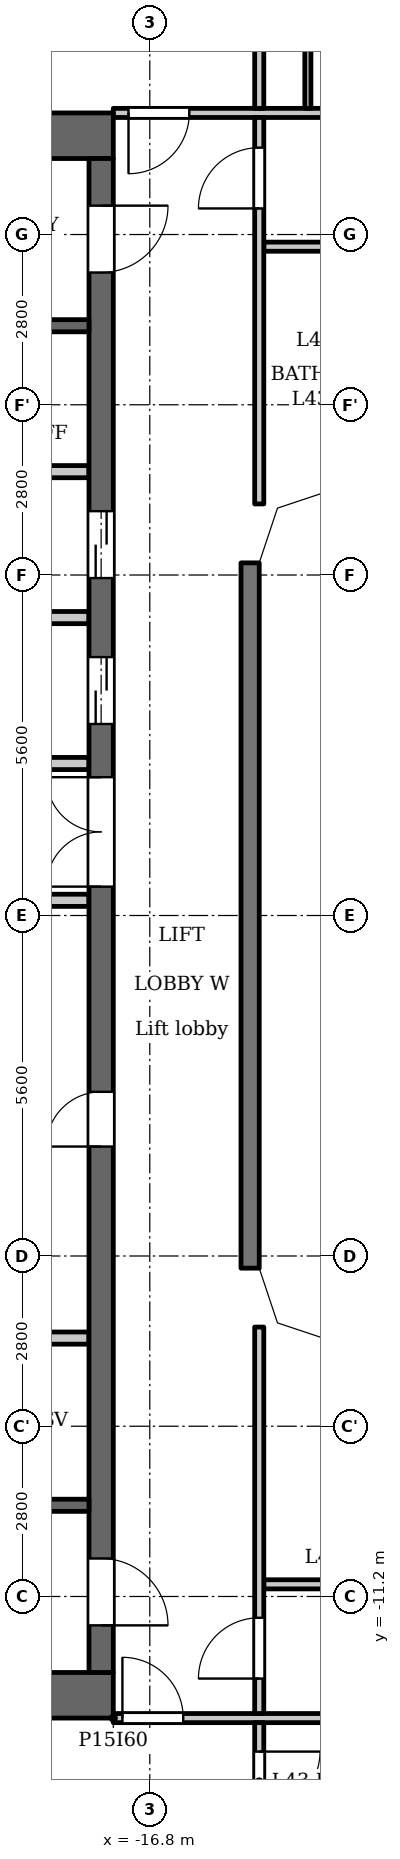
"""IFC4 building model, lengths in metres.
Left out: names, types, materials, properties, quantities, classifications, styles, units other than length and angle.
Written with IfcOpenShell. Run it as: python <this file> out.ifc"""

import sys

from ifc_helpers import new_model, si_unit, direction, frame, frame_2d, origin, place, context, subcontext, project, spatial, polyline, rectangle, outline, extrude, element, fill, save


model = new_model("IFC4")
c1 = context("Model", 3, precision=1e-05, world=origin(), true_north=direction((0.0, 1.0)))
c2 = subcontext(c1, "Body", "Model", "MODEL_VIEW")
j1 = project(units=[si_unit("LENGTHUNIT", "METRE"), si_unit("PLANEANGLEUNIT", "RADIAN")], contexts=[c1])
p1 = place(None, origin())
s1 = spatial("IfcSite", under=j1, at=p1, CompositionType="ELEMENT")
p2 = place(p1, origin())
s2 = spatial("IfcBuilding", under=s1, at=p2, CompositionType="ELEMENT")
p3 = place(p2, frame((0.0, 0.0, 167.6)))
s3 = spatial("IfcBuildingStorey", under=s2, at=p3, CompositionType="ELEMENT", Elevation=167.6)
p4 = place(p3, frame((-15.15, -5.8, 0.0), z_axis=(0.0, 0.0, 1.0), x_axis=(0.0, 1.0, 0.0)))
e1 = element("IfcWall", 1, at=p4, inside=s3, PredefinedType="SOLIDWALL", context=c2, shape_type="SweptSolid", body=[
    extrude(rectangle(XDim=11.6, YDim=0.3, at=frame_2d((5.8, 0.0))), origin(), (0.0, 0.0, 1.0), 3.2),
])
for number, where, z_axis, x_axis in (
    (2, (-17.4, 12.825, 0.0), (0.0, 0.0, 1.0), (-1.0, 0.0, 0.0)),
    (3, (-17.4, -12.825, 0.0), (0.0, 0.0, 1.0), (-1.0, 0.0, 0.0)),
):
    element("IfcWall", number, at=place(p3, frame(where, z_axis=z_axis, x_axis=x_axis)), inside=s3, PredefinedType="SHEAR", context=c2, shape_type="SweptSolid", body=[
        extrude(rectangle(XDim=10.4, YDim=0.75, at=frame_2d((5.2, 0.0))), origin(), (0.0, 0.0, 1.0), 3.2),
    ])
p5 = place(p3, frame((-17.6, -12.45, 0.0), z_axis=(0.0, 0.0, 1.0), x_axis=(0.0, 1.0, 0.0)))
e4 = element("IfcWall", 4, at=p5, inside=s3, PredefinedType="SHEAR", context=c2, shape_type="SweptSolid", body=[
    extrude(rectangle(XDim=24.9, YDim=0.4, at=frame_2d((12.45, 0.0))), origin(), (0.0, 0.0, 1.0), 3.2),
])
p6 = place(p5, frame((8.65, 0.0, 0.0)))
e5 = element("IfcOpeningElement", 5, at=p6, cuts=e4, PredefinedType="OPENING", context=c2, shape_type="SweptSolid", body=[
    extrude(rectangle(XDim=0.9, YDim=2.1, at=frame_2d((0.45, 1.05))), frame((0.0, 0.21, 0.0), z_axis=(0.0, -1.0, 0.0), x_axis=(1.0, 0.0, 0.0)), (0.0, 0.0, 1.0), 0.42),
])
p7 = place(p5, frame((15.6, 0.0, 0.0)))
e6 = element("IfcOpeningElement", 6, at=p7, cuts=e4, PredefinedType="OPENING", context=c2, shape_type="SweptSolid", body=[
    extrude(rectangle(XDim=1.1, YDim=2.1, at=frame_2d((0.55, 1.05))), frame((0.0, 0.21, 0.0), z_axis=(0.0, -1.0, 0.0), x_axis=(1.0, 0.0, 0.0)), (0.0, 0.0, 1.0), 0.42),
])
p8 = place(p5, frame((18.0, 0.0, 0.0)))
e7 = element("IfcOpeningElement", 7, at=p8, cuts=e4, PredefinedType="OPENING", context=c2, shape_type="SweptSolid", body=[
    extrude(rectangle(XDim=1.1, YDim=2.1, at=frame_2d((0.55, 1.05))), frame((0.0, 0.21, 0.0), z_axis=(0.0, -1.0, 0.0), x_axis=(1.0, 0.0, 0.0)), (0.0, 0.0, 1.0), 0.42),
])
p9 = place(p5, frame((23.025, 0.0, 0.0)))
e8 = element("IfcOpeningElement", 8, at=p9, cuts=e4, PredefinedType="OPENING", context=c2, shape_type="SweptSolid", body=[
    extrude(rectangle(XDim=1.1, YDim=2.1, at=frame_2d((0.55, 1.05))), frame((0.0, 0.21, 0.0), z_axis=(0.0, -1.0, 0.0), x_axis=(1.0, 0.0, 0.0)), (0.0, 0.0, 1.0), 0.42),
])
p10 = place(p5, frame((0.775, 0.0, 0.0)))
e9 = element("IfcOpeningElement", 9, at=p10, cuts=e4, PredefinedType="OPENING", context=c2, shape_type="SweptSolid", body=[
    extrude(rectangle(XDim=1.1, YDim=2.1, at=frame_2d((0.55, 1.05))), frame((0.0, 0.21, 0.0), z_axis=(0.0, -1.0, 0.0), x_axis=(1.0, 0.0, 0.0)), (0.0, 0.0, 1.0), 0.42),
])
p11 = place(p5, frame((12.925, 0.0, 0.0)))
e10 = element("IfcOpeningElement", 10, at=p11, cuts=e4, PredefinedType="OPENING", context=c2, shape_type="SweptSolid", body=[
    extrude(rectangle(XDim=1.8, YDim=2.1, at=frame_2d((0.9, 1.05))), frame((0.0, 0.21, 0.0), z_axis=(0.0, -1.0, 0.0), x_axis=(1.0, 0.0, 0.0)), (0.0, 0.0, 1.0), 0.42),
])
p12 = place(p3, frame((-17.8, -9.7, 0.0), z_axis=(0.0, 0.0, 1.0), x_axis=(-1.0, 0.0, 0.0)))
e11 = element("IfcWall", 11, at=p12, inside=s3, PredefinedType="SHEAR", context=c2, shape_type="SweptSolid", body=[
    extrude(rectangle(XDim=8.45, YDim=0.2, at=frame_2d((4.225, 0.0))), origin(), (0.0, 0.0, 1.0), 3.2),
])
p13 = place(p12, frame((0.85, 0.0, 0.0)))
e12 = element("IfcOpeningElement", 12, at=p13, cuts=e11, PredefinedType="OPENING", context=c2, shape_type="SweptSolid", body=[
    extrude(rectangle(XDim=1.1, YDim=2.1, at=frame_2d((0.55, 1.05))), frame((0.0, 0.11, 0.0), z_axis=(0.0, -1.0, 0.0), x_axis=(1.0, 0.0, 0.0)), (0.0, 0.0, 1.0), 0.22),
])
p14 = place(p12, frame((3.75, 0.0, 0.0)))
e13 = element("IfcOpeningElement", 13, at=p14, cuts=e11, PredefinedType="OPENING", context=c2, shape_type="SweptSolid", body=[
    extrude(rectangle(XDim=1.1, YDim=2.1, at=frame_2d((0.55, 1.05))), frame((0.0, 0.11, 0.0), z_axis=(0.0, -1.0, 0.0), x_axis=(1.0, 0.0, 0.0)), (0.0, 0.0, 1.0), 0.22),
])
p15 = place(p3, frame((-17.8, -6.95, 0.0), z_axis=(0.0, 0.0, 1.0), x_axis=(-1.0, 0.0, 0.0)))
e14 = element("IfcWall", 14, at=p15, inside=s3, PredefinedType="PARTITIONING", context=c2, shape_type="SweptSolid", body=[
    extrude(rectangle(XDim=2.8, YDim=0.2, at=frame_2d((1.4, 0.0))), origin(), (0.0, 0.0, 1.0), 3.2),
])
p16 = place(p3, frame((-17.8, 0.25, 0.0), z_axis=(0.0, 0.0, 1.0), x_axis=(-1.0, 0.0, 0.0)))
e15 = element("IfcWall", 15, at=p16, inside=s3, PredefinedType="PARTITIONING", context=c2, shape_type="SweptSolid", body=[
    extrude(rectangle(XDim=3.0, YDim=0.2, at=frame_2d((1.5, 0.0))), origin(), (0.0, 0.0, 1.0), 3.2),
])
p17 = place(p16, frame((1.98, 0.0, 0.0)))
e16 = element("IfcOpeningElement", 16, at=p17, cuts=e15, PredefinedType="OPENING", context=c2, shape_type="SweptSolid", body=[
    extrude(rectangle(XDim=0.9, YDim=2.1, at=frame_2d((0.45, 1.05))), frame((0.0, 0.11, 0.0), z_axis=(0.0, -1.0, 0.0), x_axis=(1.0, 0.0, 0.0)), (0.0, 0.0, 1.0), 0.22),
])
p18 = place(p3, frame((-17.8, 2.5, 0.0), z_axis=(0.0, 0.0, 1.0), x_axis=(-1.0, 0.0, 0.0)))
e17 = element("IfcWall", 17, at=p18, inside=s3, PredefinedType="PARTITIONING", context=c2, shape_type="SweptSolid", body=[
    extrude(rectangle(XDim=3.0, YDim=0.2, at=frame_2d((1.5, 0.0))), origin(), (0.0, 0.0, 1.0), 3.2),
])
for number, where, z_axis, x_axis in (
    (18, (-17.8, 4.9, 0.0), (0.0, 0.0, 1.0), (-1.0, 0.0, 0.0)),
    (19, (-17.8, 7.3, 0.0), (0.0, 0.0, 1.0), (-1.0, 0.0, 0.0)),
):
    element("IfcWall", number, at=place(p3, frame(where, z_axis=z_axis, x_axis=x_axis)), inside=s3, PredefinedType="PARTITIONING", context=c2, shape_type="SweptSolid", body=[
        extrude(rectangle(XDim=2.8, YDim=0.2, at=frame_2d((1.4, 0.0))), origin(), (0.0, 0.0, 1.0), 3.2),
    ])
p19 = place(p3, frame((-17.8, 9.7, 0.0), z_axis=(0.0, 0.0, 1.0), x_axis=(-1.0, 0.0, 0.0)))
e20 = element("IfcWall", 20, at=p19, inside=s3, PredefinedType="SHEAR", context=c2, shape_type="SweptSolid", body=[
    extrude(rectangle(XDim=8.45, YDim=0.2, at=frame_2d((4.225, 0.0))), origin(), (0.0, 0.0, 1.0), 3.2),
])
p20 = place(p19, frame((0.85, 0.0, 0.0)))
e21 = element("IfcOpeningElement", 21, at=p20, cuts=e20, PredefinedType="OPENING", context=c2, shape_type="SweptSolid", body=[
    extrude(rectangle(XDim=1.1, YDim=2.1, at=frame_2d((0.55, 1.05))), frame((0.0, 0.11, 0.0), z_axis=(0.0, -1.0, 0.0), x_axis=(1.0, 0.0, 0.0)), (0.0, 0.0, 1.0), 0.22),
])
p21 = place(p19, frame((3.75, 0.0, 0.0)))
e22 = element("IfcOpeningElement", 22, at=p21, cuts=e20, PredefinedType="OPENING", context=c2, shape_type="SweptSolid", body=[
    extrude(rectangle(XDim=1.1, YDim=2.1, at=frame_2d((0.55, 1.05))), frame((0.0, 0.11, 0.0), z_axis=(0.0, -1.0, 0.0), x_axis=(1.0, 0.0, 0.0)), (0.0, 0.0, 1.0), 0.22),
])
p22 = place(p3, frame((-17.4, -13.2, 0.0), z_axis=(0.0, 0.0, 1.0), x_axis=(1.0, 0.0, 0.0)))
e23 = element("IfcWall", 23, at=p22, inside=s3, PredefinedType="PARTITIONING", context=c2, shape_type="SweptSolid", body=[
    extrude(rectangle(XDim=34.8, YDim=0.15, at=frame_2d((17.4, 0.0))), origin(), (0.0, 0.0, 1.0), 3.2),
])
p23 = place(p22, frame((0.15, 0.0, 0.0)))
e24 = element("IfcOpeningElement", 24, at=p23, cuts=e23, PredefinedType="OPENING", context=c2, shape_type="SweptSolid", body=[
    extrude(rectangle(XDim=1.0, YDim=2.1, at=frame_2d((0.5, 1.05))), frame((0.0, 0.085, 0.0), z_axis=(0.0, -1.0, 0.0), x_axis=(1.0, 0.0, 0.0)), (0.0, 0.0, 1.0), 0.17),
])
p24 = place(p22, frame((33.55, 0.0, 0.0)))
e25 = element("IfcOpeningElement", 25, at=p24, cuts=e23, PredefinedType="OPENING", context=c2, shape_type="SweptSolid", body=[
    extrude(rectangle(XDim=1.0, YDim=2.1, at=frame_2d((0.5, 1.05))), frame((0.0, 0.085, 0.0), z_axis=(0.0, -1.0, 0.0), x_axis=(1.0, 0.0, 0.0)), (0.0, 0.0, 1.0), 0.17),
])
p25 = place(p22, frame((15.7, 0.0, 0.0)))
e26 = element("IfcOpeningElement", 26, at=p25, cuts=e23, PredefinedType="OPENING", context=c2, shape_type="SweptSolid", body=[
    extrude(rectangle(XDim=1.0, YDim=2.1, at=frame_2d((0.5, 1.05))), frame((0.0, 0.085, 0.0), z_axis=(0.0, -1.0, 0.0), x_axis=(1.0, 0.0, 0.0)), (0.0, 0.0, 1.0), 0.17),
])
p26 = place(p22, frame((26.9, 0.0, 0.0)))
e27 = element("IfcOpeningElement", 27, at=p26, cuts=e23, PredefinedType="OPENING", context=c2, shape_type="SweptSolid", body=[
    extrude(rectangle(XDim=1.0, YDim=2.1, at=frame_2d((0.5, 1.05))), frame((0.0, 0.085, 0.0), z_axis=(0.0, -1.0, 0.0), x_axis=(1.0, 0.0, 0.0)), (0.0, 0.0, 1.0), 0.17),
])
p27 = place(p3, frame((-14.925, -11.0, 0.0), z_axis=(0.0, 0.0, 1.0), x_axis=(1.0, 0.0, 0.0)))
e28 = element("IfcWall", 28, at=p27, inside=s3, PredefinedType="PARTITIONING", context=c2, shape_type="SweptSolid", body=[
    extrude(rectangle(XDim=29.85, YDim=0.15, at=frame_2d((14.925, 0.0))), origin(), (0.0, 0.0, 1.0), 3.2),
])
p28 = place(p27, frame((9.875, 0.0, 0.0)))
e29 = element("IfcOpeningElement", 29, at=p28, cuts=e28, PredefinedType="OPENING", context=c2, shape_type="SweptSolid", body=[
    extrude(rectangle(XDim=1.0, YDim=2.1, at=frame_2d((0.5, 1.05))), frame((0.0, 0.085, 0.0), z_axis=(0.0, -1.0, 0.0), x_axis=(1.0, 0.0, 0.0)), (0.0, 0.0, 1.0), 0.17),
])
p29 = place(p27, frame((17.875, 0.0, 0.0)))
e30 = element("IfcOpeningElement", 30, at=p29, cuts=e28, PredefinedType="OPENING", context=c2, shape_type="SweptSolid", body=[
    extrude(rectangle(XDim=1.0, YDim=2.1, at=frame_2d((0.5, 1.05))), frame((0.0, 0.085, 0.0), z_axis=(0.0, -1.0, 0.0), x_axis=(1.0, 0.0, 0.0)), (0.0, 0.0, 1.0), 0.17),
])
p30 = place(p3, frame((-14.925, 11.0, 0.0), z_axis=(0.0, 0.0, 1.0), x_axis=(1.0, 0.0, 0.0)))
e31 = element("IfcWall", 31, at=p30, inside=s3, PredefinedType="PARTITIONING", context=c2, shape_type="SweptSolid", body=[
    extrude(rectangle(XDim=29.85, YDim=0.15, at=frame_2d((14.925, 0.0))), origin(), (0.0, 0.0, 1.0), 3.2),
])
p31 = place(p30, frame((2.475, 0.0, 0.0)))
e32 = element("IfcOpeningElement", 32, at=p31, cuts=e31, PredefinedType="OPENING", context=c2, shape_type="SweptSolid", body=[
    extrude(rectangle(XDim=1.0, YDim=2.1, at=frame_2d((0.5, 1.05))), frame((0.0, 0.085, 0.0), z_axis=(0.0, -1.0, 0.0), x_axis=(1.0, 0.0, 0.0)), (0.0, 0.0, 1.0), 0.17),
])
p32 = place(p30, frame((26.275, 0.0, 0.0)))
e33 = element("IfcOpeningElement", 33, at=p32, cuts=e31, PredefinedType="OPENING", context=c2, shape_type="SweptSolid", body=[
    extrude(rectangle(XDim=1.0, YDim=2.1, at=frame_2d((0.5, 1.05))), frame((0.0, 0.085, 0.0), z_axis=(0.0, -1.0, 0.0), x_axis=(1.0, 0.0, 0.0)), (0.0, 0.0, 1.0), 0.17),
])
p33 = place(p3, frame((-17.4, 13.2, 0.0), z_axis=(0.0, 0.0, 1.0), x_axis=(1.0, 0.0, 0.0)))
e34 = element("IfcWall", 34, at=p33, inside=s3, PredefinedType="PARTITIONING", context=c2, shape_type="SweptSolid", body=[
    extrude(rectangle(XDim=34.8, YDim=0.15, at=frame_2d((17.4, 0.0))), origin(), (0.0, 0.0, 1.0), 3.2),
])
p34 = place(p33, frame((0.25, 0.0, 0.0)))
e35 = element("IfcOpeningElement", 35, at=p34, cuts=e34, PredefinedType="OPENING", context=c2, shape_type="SweptSolid", body=[
    extrude(rectangle(XDim=1.0, YDim=2.1, at=frame_2d((0.5, 1.05))), frame((0.0, 0.085, 0.0), z_axis=(0.0, -1.0, 0.0), x_axis=(1.0, 0.0, 0.0)), (0.0, 0.0, 1.0), 0.17),
])
p35 = place(p33, frame((33.65, 0.0, 0.0)))
e36 = element("IfcOpeningElement", 36, at=p35, cuts=e34, PredefinedType="OPENING", context=c2, shape_type="SweptSolid", body=[
    extrude(rectangle(XDim=1.0, YDim=2.1, at=frame_2d((0.5, 1.05))), frame((0.0, 0.085, 0.0), z_axis=(0.0, -1.0, 0.0), x_axis=(1.0, 0.0, 0.0)), (0.0, 0.0, 1.0), 0.17),
])
p36 = place(p33, frame((10.15, 0.0, 0.0)))
e37 = element("IfcOpeningElement", 37, at=p36, cuts=e34, PredefinedType="OPENING", context=c2, shape_type="SweptSolid", body=[
    extrude(rectangle(XDim=1.0, YDim=2.1, at=frame_2d((0.5, 1.05))), frame((0.0, 0.085, 0.0), z_axis=(0.0, -1.0, 0.0), x_axis=(1.0, 0.0, 0.0)), (0.0, 0.0, 1.0), 0.17),
])
p37 = place(p33, frame((15.75, 0.0, 0.0)))
e38 = element("IfcOpeningElement", 38, at=p37, cuts=e34, PredefinedType="OPENING", context=c2, shape_type="SweptSolid", body=[
    extrude(rectangle(XDim=1.0, YDim=2.1, at=frame_2d((0.5, 1.05))), frame((0.0, 0.085, 0.0), z_axis=(0.0, -1.0, 0.0), x_axis=(1.0, 0.0, 0.0)), (0.0, 0.0, 1.0), 0.17),
])
p38 = place(p33, frame((24.95, 0.0, 0.0)))
e39 = element("IfcOpeningElement", 39, at=p38, cuts=e34, PredefinedType="OPENING", context=c2, shape_type="SweptSolid", body=[
    extrude(rectangle(XDim=1.0, YDim=2.1, at=frame_2d((0.5, 1.05))), frame((0.0, 0.085, 0.0), z_axis=(0.0, -1.0, 0.0), x_axis=(1.0, 0.0, 0.0)), (0.0, 0.0, 1.0), 0.17),
])
p39 = place(p33, frame((29.95, 0.0, 0.0)))
e40 = element("IfcOpeningElement", 40, at=p39, cuts=e34, PredefinedType="OPENING", context=c2, shape_type="SweptSolid", body=[
    extrude(rectangle(XDim=1.0, YDim=2.1, at=frame_2d((0.5, 1.05))), frame((0.0, 0.085, 0.0), z_axis=(0.0, -1.0, 0.0), x_axis=(1.0, 0.0, 0.0)), (0.0, 0.0, 1.0), 0.17),
])
p40 = place(p3, frame((-15.0, -15.325, 0.0), z_axis=(0.0, 0.0, 1.0), x_axis=(0.0, 1.0, 0.0)))
e41 = element("IfcWall", 41, at=p40, inside=s3, PredefinedType="PARTITIONING", context=c2, shape_type="SweptSolid", body=[
    extrude(rectangle(XDim=2.05, YDim=0.15, at=frame_2d((1.025, 0.0))), origin(), (0.0, 0.0, 1.0), 3.2),
])
p41 = place(p40, frame((0.574, 0.0, 0.0)))
e42 = element("IfcOpeningElement", 42, at=p41, cuts=e41, PredefinedType="OPENING", context=c2, shape_type="SweptSolid", body=[
    extrude(rectangle(XDim=1.0, YDim=2.1, at=frame_2d((0.5, 1.05))), frame((0.0, 0.085, 0.0), z_axis=(0.0, -1.0, 0.0), x_axis=(1.0, 0.0, 0.0)), (0.0, 0.0, 1.0), 0.17),
])
p42 = place(p3, frame((-15.0, -13.125, 0.0), z_axis=(0.0, 0.0, 1.0), x_axis=(0.0, 1.0, 0.0)))
e43 = element("IfcWall", 43, at=p42, inside=s3, PredefinedType="PARTITIONING", context=c2, shape_type="SweptSolid", body=[
    extrude(rectangle(XDim=6.356, YDim=0.15, at=frame_2d((3.178, 0.0))), origin(), (0.0, 0.0, 1.0), 3.2),
])
p43 = place(p42, frame((0.575, 0.0, 0.0)))
e44 = element("IfcOpeningElement", 44, at=p43, cuts=e43, PredefinedType="OPENING", context=c2, shape_type="SweptSolid", body=[
    extrude(rectangle(XDim=1.0, YDim=2.1, at=frame_2d((0.5, 1.05))), frame((0.0, 0.085, 0.0), z_axis=(0.0, -1.0, 0.0), x_axis=(1.0, 0.0, 0.0)), (0.0, 0.0, 1.0), 0.17),
])
p44 = place(p3, frame((-15.0, 6.769, 0.0), z_axis=(0.0, 0.0, 1.0), x_axis=(0.0, 1.0, 0.0)))
e45 = element("IfcWall", 45, at=p44, inside=s3, PredefinedType="PARTITIONING", context=c2, shape_type="SweptSolid", body=[
    extrude(rectangle(XDim=6.356, YDim=0.15, at=frame_2d((3.178, 0.0))), origin(), (0.0, 0.0, 1.0), 3.2),
])
p45 = place(p44, frame((4.86, 0.0, 0.0)))
e46 = element("IfcOpeningElement", 46, at=p45, cuts=e45, PredefinedType="OPENING", context=c2, shape_type="SweptSolid", body=[
    extrude(rectangle(XDim=1.0, YDim=2.1, at=frame_2d((0.5, 1.05))), frame((0.0, 0.085, 0.0), z_axis=(0.0, -1.0, 0.0), x_axis=(1.0, 0.0, 0.0)), (0.0, 0.0, 1.0), 0.17),
])
p46 = place(p3, frame((-15.0, 13.275, 0.0), z_axis=(0.0, 0.0, 1.0), x_axis=(0.0, 1.0, 0.0)))
e47 = element("IfcWall", 47, at=p46, inside=s3, PredefinedType="PARTITIONING", context=c2, shape_type="SweptSolid", body=[
    extrude(rectangle(XDim=2.05, YDim=0.15, at=frame_2d((1.025, 0.0))), origin(), (0.0, 0.0, 1.0), 3.2),
])
p47 = place(p3, frame((-14.2, 13.275, 0.0), z_axis=(0.0, 0.0, 1.0), x_axis=(0.0, 1.0, 0.0)))
e48 = element("IfcWall", 48, at=p47, inside=s3, PredefinedType="PARTITIONING", context=c2, shape_type="SweptSolid", body=[
    extrude(rectangle(XDim=3.175, YDim=0.1, at=frame_2d((1.587, 0.0))), origin(), (0.0, 0.0, 1.0), 3.2),
])
p48 = place(p3, origin())
e49 = element("IfcWall", 49, at=p48, inside=s3, PredefinedType="SOLIDWALL", context=c2, shape_type="SweptSolid", body=[
    extrude(outline(polyline([(-13.849, 7.3), (-14.937, 6.937), (-15.3, 5.849), (-15.3, 5.8), (-15.0, 5.8), (-14.7, 6.7), (-13.8, 7.0), (-13.8, 7.3), (-13.849, 7.3)])), origin(), (0.0, 0.0, 1.0), 3.2),
])
e50 = element("IfcWall", 50, at=p48, inside=s3, PredefinedType="SOLIDWALL", context=c2, shape_type="SweptSolid", body=[
    extrude(outline(polyline([(-14.937, -6.937), (-13.849, -7.3), (-13.8, -7.3), (-13.8, -7.0), (-14.7, -6.7), (-15.0, -5.8), (-15.3, -5.8), (-15.3, -5.849), (-14.937, -6.937)])), origin(), (0.0, 0.0, 1.0), 3.2),
])
p49 = place(p6, origin())
e51 = element("IfcDoor", 51, at=p49, inside=s3, OperationType="SINGLE_SWING_RIGHT", PredefinedType="DOOR", context=c2, shape_type="SweptSolid", body=[
    extrude(rectangle(XDim=0.9, YDim=2.1, at=frame_2d((0.45, 1.05))), frame((0.0, 0.025, 0.0), z_axis=(0.0, -1.0, 0.0), x_axis=(1.0, 0.0, 0.0)), (0.0, 0.0, 1.0), 0.05),
])
fill(e5, e51)
p50 = place(p7, origin())
e52 = element("IfcDoor", 52, at=p50, inside=s3, OperationType="DOUBLE_DOOR_SLIDING", PredefinedType="DOOR", context=c2, shape_type="SweptSolid", body=[
    extrude(rectangle(XDim=1.1, YDim=2.1, at=frame_2d((0.55, 1.05))), frame((0.0, 0.025, 0.0), z_axis=(0.0, -1.0, 0.0), x_axis=(1.0, 0.0, 0.0)), (0.0, 0.0, 1.0), 0.05),
])
fill(e6, e52)
p51 = place(p8, origin())
e53 = element("IfcDoor", 53, at=p51, inside=s3, OperationType="DOUBLE_DOOR_SLIDING", PredefinedType="DOOR", context=c2, shape_type="SweptSolid", body=[
    extrude(rectangle(XDim=1.1, YDim=2.1, at=frame_2d((0.55, 1.05))), frame((0.0, 0.025, 0.0), z_axis=(0.0, -1.0, 0.0), x_axis=(1.0, 0.0, 0.0)), (0.0, 0.0, 1.0), 0.05),
])
fill(e7, e53)
p52 = place(p9, origin())
e54 = element("IfcDoor", 54, at=p52, inside=s3, OperationType="SINGLE_SWING_RIGHT", PredefinedType="DOOR", context=c2, shape_type="SweptSolid", body=[
    extrude(rectangle(XDim=1.1, YDim=2.1, at=frame_2d((0.55, 1.05))), frame((0.0, 0.025, 0.0), z_axis=(0.0, -1.0, 0.0), x_axis=(1.0, 0.0, 0.0)), (0.0, 0.0, 1.0), 0.05),
])
fill(e8, e54)
p53 = place(p10, origin())
e55 = element("IfcDoor", 55, at=p53, inside=s3, OperationType="SINGLE_SWING_LEFT", PredefinedType="DOOR", context=c2, shape_type="SweptSolid", body=[
    extrude(rectangle(XDim=1.1, YDim=2.1, at=frame_2d((0.55, 1.05))), frame((0.0, 0.025, 0.0), z_axis=(0.0, -1.0, 0.0), x_axis=(1.0, 0.0, 0.0)), (0.0, 0.0, 1.0), 0.05),
])
fill(e9, e55)
p54 = place(p11, origin())
e56 = element("IfcDoor", 56, at=p54, inside=s3, OperationType="DOUBLE_DOOR_SINGLE_SWING", PredefinedType="DOOR", context=c2, shape_type="SweptSolid", body=[
    extrude(rectangle(XDim=1.8, YDim=2.1, at=frame_2d((0.9, 1.05))), frame((0.0, 0.025, 0.0), z_axis=(0.0, -1.0, 0.0), x_axis=(1.0, 0.0, 0.0)), (0.0, 0.0, 1.0), 0.05),
])
fill(e10, e56)
p55 = place(p45, origin())
e57 = element("IfcDoor", 57, at=p55, inside=s3, OperationType="SINGLE_SWING_RIGHT", PredefinedType="DOOR", context=c2, shape_type="SweptSolid", body=[
    extrude(rectangle(XDim=1.0, YDim=2.1, at=frame_2d((0.5, 1.05))), frame((0.0, 0.025, 0.0), z_axis=(0.0, -1.0, 0.0), x_axis=(1.0, 0.0, 0.0)), (0.0, 0.0, 1.0), 0.05),
])
fill(e46, e57)
p56 = place(p34, origin())
e58 = element("IfcDoor", 58, at=p56, inside=s3, OperationType="SINGLE_SWING_LEFT", PredefinedType="DOOR", context=c2, shape_type="SweptSolid", body=[
    extrude(rectangle(XDim=1.0, YDim=2.1, at=frame_2d((0.5, 1.05))), frame((0.0, 0.025, 0.0), z_axis=(0.0, -1.0, 0.0), x_axis=(1.0, 0.0, 0.0)), (0.0, 0.0, 1.0), 0.05),
])
fill(e35, e58)
p57 = place(p43, origin())
e59 = element("IfcDoor", 59, at=p57, inside=s3, OperationType="SINGLE_SWING_RIGHT", PredefinedType="DOOR", context=c2, shape_type="SweptSolid", body=[
    extrude(rectangle(XDim=1.0, YDim=2.1, at=frame_2d((0.5, 1.05))), frame((0.0, 0.025, 0.0), z_axis=(0.0, -1.0, 0.0), x_axis=(1.0, 0.0, 0.0)), (0.0, 0.0, 1.0), 0.05),
])
fill(e44, e59)
p58 = place(p23, origin())
e60 = element("IfcDoor", 60, at=p58, inside=s3, OperationType="SINGLE_SWING_RIGHT", PredefinedType="DOOR", context=c2, shape_type="SweptSolid", body=[
    extrude(rectangle(XDim=1.0, YDim=2.1, at=frame_2d((0.5, 1.05))), frame((0.0, 0.025, 0.0), z_axis=(0.0, -1.0, 0.0), x_axis=(1.0, 0.0, 0.0)), (0.0, 0.0, 1.0), 0.05),
])
fill(e24, e60)
p59 = place(p41, origin())
e61 = element("IfcDoor", 61, at=p59, inside=s3, OperationType="SINGLE_SWING_RIGHT", PredefinedType="DOOR", context=c2, shape_type="SweptSolid", body=[
    extrude(rectangle(XDim=1.0, YDim=2.1, at=frame_2d((0.5, 1.05))), frame((0.0, 0.025, 0.0), z_axis=(0.0, -1.0, 0.0), x_axis=(1.0, 0.0, 0.0)), (0.0, 0.0, 1.0), 0.05),
])
fill(e42, e61)
save(model, sys.argv[1])
